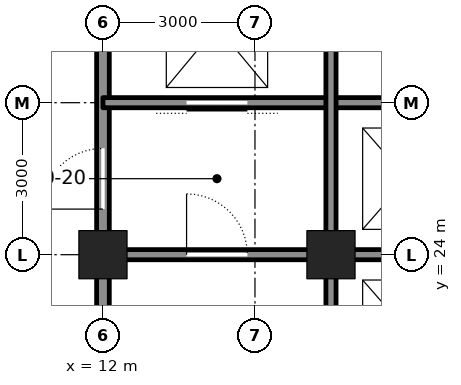
"""IFC4 building model, lengths in metres.
Left out: names, types, materials, properties, quantities, classifications, styles, units other than length and angle.
Written with IfcOpenShell. Run it as: python <this file> out.ifc"""

import sys

from ifc_helpers import new_model, si_unit, direction, frame, frame_2d, origin, origin_2d, place, context, subcontext, project, spatial, rectangle, hollow_rectangle, extrude, element, fill, save


model = new_model("IFC4")
c1 = context("Model", 3, precision=1e-05, world=origin(), true_north=direction((0.0, 1.0)))
c2 = subcontext(c1, "Body", "Model", "MODEL_VIEW")
j1 = project(units=[si_unit("LENGTHUNIT", "METRE"), si_unit("PLANEANGLEUNIT", "RADIAN")], contexts=[c1])
p1 = place(None, origin())
s1 = spatial("IfcSite", under=j1, at=p1, CompositionType="ELEMENT")
p2 = place(p1, origin())
s2 = spatial("IfcBuilding", under=s1, at=p2, CompositionType="ELEMENT")
p3 = place(p2, origin())
s3 = spatial("IfcBuildingStorey", under=s2, at=p3, CompositionType="ELEMENT", Elevation=0.0)
for number, where, z_axis, x_axis in (
    (1, (12.0, 24.0, 0.0), (0.0, 0.0, 1.0), (1.0, 0.0, 0.0)),
    (2, (16.5, 24.0, 0.0), (0.0, 0.0, 1.0), (1.0, 0.0, 0.0)),
):
    element("IfcColumn", number, at=place(p3, frame(where, z_axis=z_axis, x_axis=x_axis)), inside=s3, PredefinedType="COLUMN", context=c2, shape_type="SweptSolid", body=[
        extrude(hollow_rectangle(XDim=0.95, YDim=0.95, WallThickness=0.095, at=origin_2d()), origin(), (0.0, 0.0, 1.0), 6.0),
    ])
p4 = place(p3, frame((12.0, 21.25, 0.0), z_axis=(0.0, 0.0, 1.0), x_axis=(0.0, 1.0, 0.0)))
e3 = element("IfcWall", 3, at=p4, inside=s3, PredefinedType="SOLIDWALL", context=c2, shape_type="SweptSolid", body=[
    extrude(rectangle(XDim=2.5, YDim=0.25, at=frame_2d((1.25, 0.0))), origin(), (0.0, 0.0, 1.0), 4.873),
])
p5 = place(p3, frame((12.0, 24.25, 0.0), z_axis=(0.0, 0.0, 1.0), x_axis=(0.0, 1.0, 0.0)))
e4 = element("IfcWall", 4, at=p5, inside=s3, PredefinedType="SOLIDWALL", context=c2, shape_type="SweptSolid", body=[
    extrude(rectangle(XDim=8.5, YDim=0.25, at=frame_2d((4.25, 0.0))), origin(), (0.0, 0.0, 1.0), 4.873),
])
p6 = place(p5, frame((0.65, 0.0, 0.0)))
e5 = element("IfcOpeningElement", 5, at=p6, cuts=e4, PredefinedType="OPENING", context=c2, shape_type="SweptSolid", body=[
    extrude(rectangle(XDim=1.2, YDim=2.1, at=frame_2d((0.6, 1.05))), frame((0.0, 0.135, 0.0), z_axis=(0.0, -1.0, 0.0), x_axis=(1.0, 0.0, 0.0)), (0.0, 0.0, 1.0), 0.27),
])
p7 = place(p5, frame((6.875, 0.0, 0.0)))
e6 = element("IfcOpeningElement", 6, at=p7, cuts=e4, PredefinedType="OPENING", context=c2, shape_type="SweptSolid", body=[
    extrude(rectangle(XDim=0.75, YDim=2.1, at=frame_2d((0.375, 1.05))), frame((0.0, 0.135, 0.0), z_axis=(0.0, -1.0, 0.0), x_axis=(1.0, 0.0, 0.0)), (0.0, 0.0, 1.0), 0.27),
])
p8 = place(p3, frame((12.25, 24.0, 0.0), z_axis=(0.0, 0.0, 1.0), x_axis=(1.0, 0.0, 0.0)))
e7 = element("IfcWall", 7, at=p8, inside=s3, PredefinedType="SOLIDWALL", context=c2, shape_type="SweptSolid", body=[
    extrude(rectangle(XDim=4.0, YDim=0.2, at=frame_2d((2.0, 0.0))), origin(), (0.0, 0.0, 1.0), 4.85),
])
p9 = place(p8, frame((1.4, 0.0, 0.0)))
e8 = element("IfcOpeningElement", 8, at=p9, cuts=e7, PredefinedType="OPENING", context=c2, shape_type="SweptSolid", body=[
    extrude(rectangle(XDim=1.2, YDim=2.1, at=frame_2d((0.6, 1.05))), frame((0.0, 0.11, 0.0), z_axis=(0.0, -1.0, 0.0), x_axis=(1.0, 0.0, 0.0)), (0.0, 0.0, 1.0), 0.22),
])
p10 = place(p3, frame((16.75, 24.0, 0.0), z_axis=(0.0, 0.0, 1.0), x_axis=(1.0, 0.0, 0.0)))
e9 = element("IfcWall", 9, at=p10, inside=s3, PredefinedType="SOLIDWALL", context=c2, shape_type="SweptSolid", body=[
    extrude(rectangle(XDim=2.75, YDim=0.2, at=frame_2d((1.375, 0.0))), origin(), (0.0, 0.0, 1.0), 4.85),
])
p11 = place(p3, frame((12.0, 27.0, 0.0), z_axis=(0.0, 0.0, 1.0), x_axis=(1.0, 0.0, 0.0)))
e10 = element("IfcWall", 10, at=p11, inside=s3, PredefinedType="SOLIDWALL", context=c2, shape_type="SweptSolid", body=[
    extrude(rectangle(XDim=7.5, YDim=0.2, at=frame_2d((3.75, 0.0))), origin(), (0.0, 0.0, 1.0), 5.8),
])
p12 = place(p11, frame((1.65, 0.0, 0.0)))
e11 = element("IfcOpeningElement", 11, at=p12, cuts=e10, PredefinedType="OPENING", context=c2, shape_type="SweptSolid", body=[
    extrude(rectangle(XDim=1.2, YDim=2.1, at=frame_2d((0.6, 1.05))), frame((0.0, 0.11, 0.0), z_axis=(0.0, -1.0, 0.0), x_axis=(1.0, 0.0, 0.0)), (0.0, 0.0, 1.0), 0.22),
])
p13 = place(p3, frame((16.5, 21.25, 0.0), z_axis=(0.0, 0.0, 1.0), x_axis=(0.0, 1.0, 0.0)))
e12 = element("IfcWall", 12, at=p13, inside=s3, PredefinedType="SOLIDWALL", context=c2, shape_type="SweptSolid", body=[
    extrude(rectangle(XDim=2.5, YDim=0.2, at=frame_2d((1.25, 0.0))), origin(), (0.0, 0.0, 1.0), 4.873),
])
p14 = place(p3, frame((16.5, 24.25, 0.0), z_axis=(0.0, 0.0, 1.0), x_axis=(0.0, 1.0, 0.0)))
e13 = element("IfcWall", 13, at=p14, inside=s3, PredefinedType="SOLIDWALL", context=c2, shape_type="SweptSolid", body=[
    extrude(rectangle(XDim=8.5, YDim=0.2, at=frame_2d((4.25, 0.0))), origin(), (0.0, 0.0, 1.0), 4.873),
])
p15 = place(p9, origin())
e14 = element("IfcDoor", 14, at=p15, inside=s3, OperationType="SINGLE_SWING_LEFT", PredefinedType="DOOR", context=c2, shape_type="SweptSolid", body=[
    extrude(rectangle(XDim=1.2, YDim=2.1, at=frame_2d((0.6, 1.05))), frame((0.0, 0.025, 0.0), z_axis=(0.0, -1.0, 0.0), x_axis=(1.0, 0.0, 0.0)), (0.0, 0.0, 1.0), 0.05),
])
fill(e8, e14)
p16 = place(p6, origin())
e15 = element("IfcDoor", 15, at=p16, inside=s3, OperationType="SINGLE_SWING_LEFT", PredefinedType="DOOR", context=c2, shape_type="SweptSolid", body=[
    extrude(rectangle(XDim=1.2, YDim=2.1, at=frame_2d((0.6, 1.05))), frame((0.0, 0.025, 0.0), z_axis=(0.0, -1.0, 0.0), x_axis=(1.0, 0.0, 0.0)), (0.0, 0.0, 1.0), 0.05),
])
fill(e5, e15)
p17 = place(p12, origin())
e16 = element("IfcDoor", 16, at=p17, inside=s3, OperationType="DOUBLE_DOOR_SLIDING", PredefinedType="DOOR", context=c2, shape_type="SweptSolid", body=[
    extrude(rectangle(XDim=1.2, YDim=2.1, at=frame_2d((0.6, 1.05))), frame((0.0, 0.025, 0.0), z_axis=(0.0, -1.0, 0.0), x_axis=(1.0, 0.0, 0.0)), (0.0, 0.0, 1.0), 0.05),
])
fill(e11, e16)
save(model, sys.argv[1])
